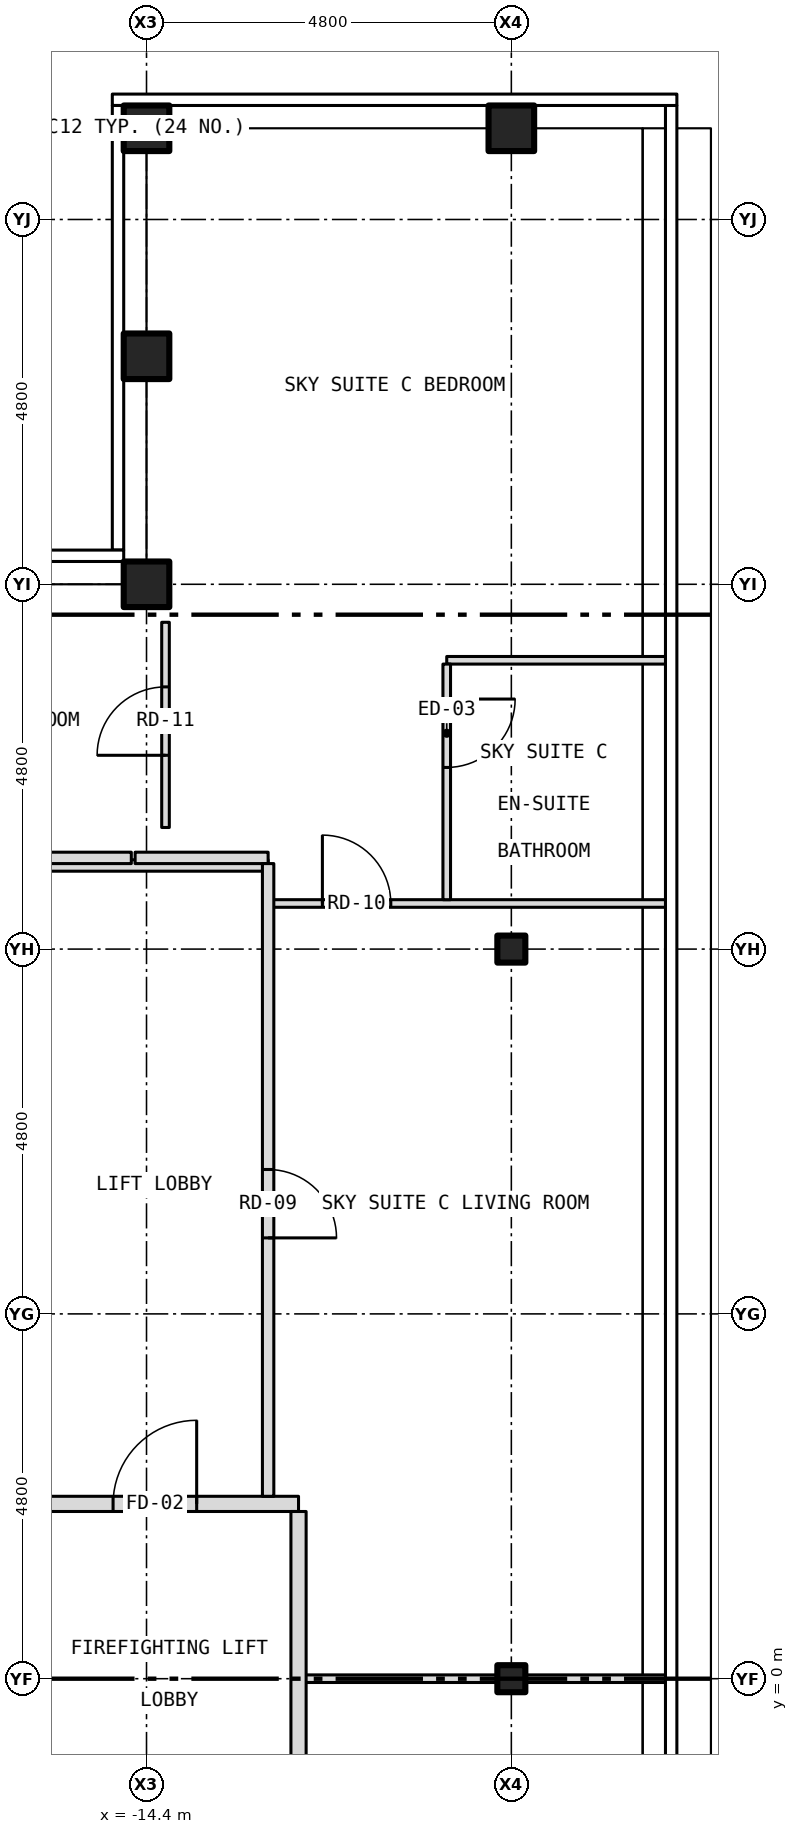
"""IFC4 building model, lengths in metres.
Left out: names, types, materials, properties, quantities, classifications, styles, units other than length and angle.
Written with IfcOpenShell. Run it as: python <this file> out.ifc"""

import sys

from ifc_helpers import new_model, si_unit, direction, frame, frame_2d, origin, origin_2d, place, context, subcontext, project, spatial, rectangle, hollow_rectangle, i_section, extrude, element, fill, save


model = new_model("IFC4")
c1 = context("Model", 3, precision=1e-05, world=origin(), true_north=direction((0.0, 1.0)))
c2 = subcontext(c1, "Body", "Model", "MODEL_VIEW")
j1 = project(units=[si_unit("LENGTHUNIT", "METRE"), si_unit("PLANEANGLEUNIT", "RADIAN")], contexts=[c1])
p1 = place(None, origin())
s1 = spatial("IfcSite", under=j1, at=p1, CompositionType="ELEMENT")
p2 = place(p1, origin())
s2 = spatial("IfcBuilding", under=s1, at=p2, CompositionType="ELEMENT")
p3 = place(p2, frame((0.0, 0.0, 269.0)))
s3 = spatial("IfcBuildingStorey", under=s2, at=p3, CompositionType="ELEMENT", Elevation=269.0)
for number, where, z_axis, x_axis in (
    (1, (-14.4, 20.4, -0.15), (0.0, 0.0, 1.0), (1.0, 0.0, 0.0)),
    (2, (-9.6, 20.4, -0.15), (0.0, 0.0, 1.0), (1.0, 0.0, 0.0)),
    (3, (-14.4, 14.4, -0.15), (0.0, 0.0, 1.0), (1.0, 0.0, 0.0)),
    (4, (-14.4, 17.4, -0.15), (0.0, 0.0, 1.0), (1.0, 0.0, 0.0)),
):
    element("IfcColumn", number, at=place(p3, frame(where, z_axis=z_axis, x_axis=x_axis)), inside=s3, PredefinedType="COLUMN", context=c2, shape_type="SweptSolid", body=[
        extrude(hollow_rectangle(XDim=0.6, YDim=0.6, WallThickness=0.03, at=origin_2d()), origin(), (0.0, 0.0, 1.0), 3.5),
    ])
for number, where, z_axis, x_axis in (
    (5, (-9.6, 0.0, -0.15), (0.0, 0.0, 1.0), (1.0, 0.0, 0.0)),
    (6, (-9.6, 9.6, -0.15), (0.0, 0.0, 1.0), (1.0, 0.0, 0.0)),
):
    element("IfcColumn", number, at=place(p3, frame(where, z_axis=z_axis, x_axis=x_axis)), inside=s3, PredefinedType="COLUMN", context=c2, shape_type="SweptSolid", body=[
        extrude(i_section(OverallWidth=0.368, OverallDepth=0.356, WebThickness=0.011, FlangeThickness=0.018, at=origin_2d()), origin(), (0.0, 0.0, 1.0), 3.5),
    ])
p4 = place(p3, frame((-12.4, 0.0, 0.0), z_axis=(0.0, 0.0, 1.0), x_axis=(1.0, 0.0, 0.0)))
e7 = element("IfcWall", 7, at=p4, inside=s3, PredefinedType="PARTITIONING", context=c2, shape_type="SweptSolid", body=[
    extrude(rectangle(XDim=2.616, YDim=0.1, at=frame_2d((1.308, 0.0))), origin(), (0.0, 0.0, 1.0), 2.728),
])
p5 = place(p3, frame((-9.784, 0.0, 0.0), z_axis=(0.0, 0.0, 1.0), x_axis=(1.0, 0.0, 0.0)))
e8 = element("IfcWall", 8, at=p5, inside=s3, PredefinedType="PARTITIONING", context=c2, shape_type="SweptSolid", body=[
    extrude(rectangle(XDim=0.368, YDim=0.1, at=frame_2d((0.184, 0.0))), origin(), (0.0, 0.0, 1.0), 3.35),
])
p6 = place(p3, frame((-9.416, 0.0, 0.0), z_axis=(0.0, 0.0, 1.0), x_axis=(1.0, 0.0, 0.0)))
e9 = element("IfcWall", 9, at=p6, inside=s3, PredefinedType="PARTITIONING", context=c2, shape_type="SweptSolid", body=[
    extrude(rectangle(XDim=1.874, YDim=0.1, at=frame_2d((0.937, 0.0))), origin(), (0.0, 0.0, 1.0), 2.728),
])
p7 = place(p3, frame((-15.68, 2.3, 0.0), z_axis=(0.0, 0.0, 1.0), x_axis=(1.0, 0.0, 0.0)))
e10 = element("IfcWall", 10, at=p7, inside=s3, PredefinedType="PARTITIONING", context=c2, shape_type="SweptSolid", body=[
    extrude(rectangle(XDim=3.28, YDim=0.2, at=frame_2d((1.64, 0.0))), origin(), (0.0, 0.0, 1.0), 3.35),
])
p8 = place(p7, frame((0.84, 0.0, 0.0)))
e11 = element("IfcOpeningElement", 11, at=p8, cuts=e10, PredefinedType="OPENING", context=c2, shape_type="SweptSolid", body=[
    extrude(rectangle(XDim=1.1, YDim=2.1, at=frame_2d((0.55, 1.05))), frame((0.0, 0.112, 0.0), z_axis=(0.0, -1.0, 0.0), x_axis=(1.0, 0.0, 0.0)), (0.0, 0.0, 1.0), 0.224),
])
p9 = place(p3, frame((-12.8, 10.2, 0.0), z_axis=(0.0, 0.0, 1.0), x_axis=(1.0, 0.0, 0.0)))
e12 = element("IfcWall", 12, at=p9, inside=s3, PredefinedType="PARTITIONING", context=c2, shape_type="SweptSolid", body=[
    extrude(rectangle(XDim=5.258, YDim=0.1, at=frame_2d((2.629, 0.0))), origin(), (0.0, 0.0, 1.0), 3.35),
])
p10 = place(p9, frame((0.714, 0.0, 0.0)))
e13 = element("IfcOpeningElement", 13, at=p10, cuts=e12, PredefinedType="OPENING", context=c2, shape_type="SweptSolid", body=[
    extrude(rectangle(XDim=0.9, YDim=2.1, at=frame_2d((0.45, 1.05))), frame((0.0, 0.062, 0.0), z_axis=(0.0, -1.0, 0.0), x_axis=(1.0, 0.0, 0.0)), (0.0, 0.0, 1.0), 0.124),
])
p11 = place(p3, frame((-15.68, 10.7, 0.0), z_axis=(0.0, 0.0, 1.0), x_axis=(1.0, 0.0, 0.0)))
e14 = element("IfcWall", 14, at=p11, inside=s3, PredefinedType="PARTITIONING", context=c2, shape_type="SweptSolid", body=[
    extrude(rectangle(XDim=2.88, YDim=0.15, at=frame_2d((1.44, 0.0))), origin(), (0.0, 0.0, 1.0), 3.35),
])
p12 = place(p3, frame((-15.68, 10.8, 0.0), z_axis=(0.0, 0.0, 1.0), x_axis=(1.0, 0.0, 0.0)))
e15 = element("IfcWall", 15, at=p12, inside=s3, PredefinedType="PARTITIONING", context=c2, shape_type="SweptSolid", body=[
    extrude(rectangle(XDim=1.08, YDim=0.15, at=frame_2d((0.54, 0.0))), origin(), (0.0, 0.0, 1.0), 3.35),
])
p13 = place(p3, frame((-14.55, 10.8, 0.0), z_axis=(0.0, 0.0, 1.0), x_axis=(1.0, 0.0, 0.0)))
e16 = element("IfcWall", 16, at=p13, inside=s3, PredefinedType="PARTITIONING", context=c2, shape_type="SweptSolid", body=[
    extrude(rectangle(XDim=1.75, YDim=0.15, at=frame_2d((0.875, 0.0))), origin(), (0.0, 0.0, 1.0), 3.35),
])
p14 = place(p3, frame((-10.45, 13.4, 0.0), z_axis=(0.0, 0.0, 1.0), x_axis=(1.0, 0.0, 0.0)))
e17 = element("IfcWall", 17, at=p14, inside=s3, PredefinedType="PARTITIONING", context=c2, shape_type="SweptSolid", body=[
    extrude(rectangle(XDim=2.908, YDim=0.1, at=frame_2d((1.454, 0.0))), origin(), (0.0, 0.0, 1.0), 3.35),
])
p15 = place(p3, frame((-14.15, 11.2, 0.0), z_axis=(0.0, 0.0, 1.0), x_axis=(0.0, 1.0, 0.0)))
e18 = element("IfcWall", 18, at=p15, inside=s3, PredefinedType="PARTITIONING", context=c2, shape_type="SweptSolid", body=[
    extrude(rectangle(XDim=2.7, YDim=0.1, at=frame_2d((1.35, 0.0))), origin(), (0.0, 0.0, 1.0), 3.35),
])
p16 = place(p15, frame((0.95, 0.0, 0.0)))
e19 = element("IfcOpeningElement", 19, at=p16, cuts=e18, PredefinedType="OPENING", context=c2, shape_type="SweptSolid", body=[
    extrude(rectangle(XDim=0.9, YDim=2.1, at=frame_2d((0.45, 1.05))), frame((0.0, 0.062, 0.0), z_axis=(0.0, -1.0, 0.0), x_axis=(1.0, 0.0, 0.0)), (0.0, 0.0, 1.0), 0.124),
])
p17 = place(p3, frame((-12.8, 2.4, 0.0), z_axis=(0.0, 0.0, 1.0), x_axis=(0.0, 1.0, 0.0)))
e20 = element("IfcWall", 20, at=p17, inside=s3, PredefinedType="PARTITIONING", context=c2, shape_type="SweptSolid", body=[
    extrude(rectangle(XDim=8.325, YDim=0.15, at=frame_2d((4.163, 0.0))), origin(), (0.0, 0.0, 1.0), 3.35),
])
p18 = place(p17, frame((3.4, 0.0, 0.0)))
e21 = element("IfcOpeningElement", 21, at=p18, cuts=e20, PredefinedType="OPENING", context=c2, shape_type="SweptSolid", body=[
    extrude(rectangle(XDim=0.9, YDim=2.1, at=frame_2d((0.45, 1.05))), frame((0.0, 0.087, 0.0), z_axis=(0.0, -1.0, 0.0), x_axis=(1.0, 0.0, 0.0)), (0.0, 0.0, 1.0), 0.174),
])
p19 = place(p3, frame((-12.4, -1.8, 0.0), z_axis=(0.0, 0.0, 1.0), x_axis=(0.0, 1.0, 0.0)))
e22 = element("IfcWall", 22, at=p19, inside=s3, PredefinedType="PARTITIONING", context=c2, shape_type="SweptSolid", body=[
    extrude(rectangle(XDim=4.0, YDim=0.2, at=frame_2d((2.0, 0.0))), origin(), (0.0, 0.0, 1.0), 3.35),
])
p20 = place(p3, frame((-10.45, 10.25, 0.0), z_axis=(0.0, 0.0, 1.0), x_axis=(0.0, 1.0, 0.0)))
e23 = element("IfcWall", 23, at=p20, inside=s3, PredefinedType="PARTITIONING", context=c2, shape_type="SweptSolid", body=[
    extrude(rectangle(XDim=3.1, YDim=0.1, at=frame_2d((1.55, 0.0))), origin(), (0.0, 0.0, 1.0), 3.35),
])
p21 = place(p20, frame((1.74, 0.0, 0.0)))
e24 = element("IfcOpeningElement", 24, at=p21, cuts=e23, PredefinedType="OPENING", context=c2, shape_type="SweptSolid", body=[
    extrude(rectangle(XDim=0.9, YDim=2.1, at=frame_2d((0.45, 1.05))), frame((0.0, 0.062, 0.0), z_axis=(0.0, -1.0, 0.0), x_axis=(1.0, 0.0, 0.0)), (0.0, 0.0, 1.0), 0.124),
])
p22 = place(p8, origin())
e25 = element("IfcDoor", 25, at=p22, inside=s3, OperationType="SINGLE_SWING_RIGHT", PredefinedType="DOOR", context=c2, shape_type="SweptSolid", body=[
    extrude(rectangle(XDim=1.1, YDim=2.1, at=frame_2d((0.55, 1.05))), frame((0.0, 0.025, 0.0), z_axis=(0.0, -1.0, 0.0), x_axis=(1.0, 0.0, 0.0)), (0.0, 0.0, 1.0), 0.05),
])
fill(e11, e25)
p23 = place(p18, origin())
e26 = element("IfcDoor", 26, at=p23, inside=s3, OperationType="SINGLE_SWING_LEFT", PredefinedType="DOOR", context=c2, shape_type="SweptSolid", body=[
    extrude(rectangle(XDim=0.9, YDim=2.1, at=frame_2d((0.45, 1.05))), frame((0.0, 0.025, 0.0), z_axis=(0.0, -1.0, 0.0), x_axis=(1.0, 0.0, 0.0)), (0.0, 0.0, 1.0), 0.05),
])
fill(e21, e26)
p24 = place(p10, origin())
e27 = element("IfcDoor", 27, at=p24, inside=s3, OperationType="SINGLE_SWING_LEFT", PredefinedType="DOOR", context=c2, shape_type="SweptSolid", body=[
    extrude(rectangle(XDim=0.9, YDim=2.1, at=frame_2d((0.45, 1.05))), frame((0.0, 0.025, 0.0), z_axis=(0.0, -1.0, 0.0), x_axis=(1.0, 0.0, 0.0)), (0.0, 0.0, 1.0), 0.05),
])
fill(e13, e27)
p25 = place(p21, origin())
e28 = element("IfcDoor", 28, at=p25, inside=s3, OperationType="SINGLE_SWING_RIGHT", PredefinedType="DOOR", context=c2, shape_type="SweptSolid", body=[
    extrude(rectangle(XDim=0.9, YDim=2.1, at=frame_2d((0.45, 1.05))), frame((0.0, 0.025, 0.0), z_axis=(0.0, -1.0, 0.0), x_axis=(1.0, 0.0, 0.0)), (0.0, 0.0, 1.0), 0.05),
])
fill(e24, e28)
p26 = place(p16, origin())
e29 = element("IfcDoor", 29, at=p26, inside=s3, OperationType="SINGLE_SWING_LEFT", PredefinedType="DOOR", context=c2, shape_type="SweptSolid", body=[
    extrude(rectangle(XDim=0.9, YDim=2.1, at=frame_2d((0.45, 1.05))), frame((0.0, 0.025, 0.0), z_axis=(0.0, -1.0, 0.0), x_axis=(1.0, 0.0, 0.0)), (0.0, 0.0, 1.0), 0.05),
])
fill(e19, e29)
save(model, sys.argv[1])
